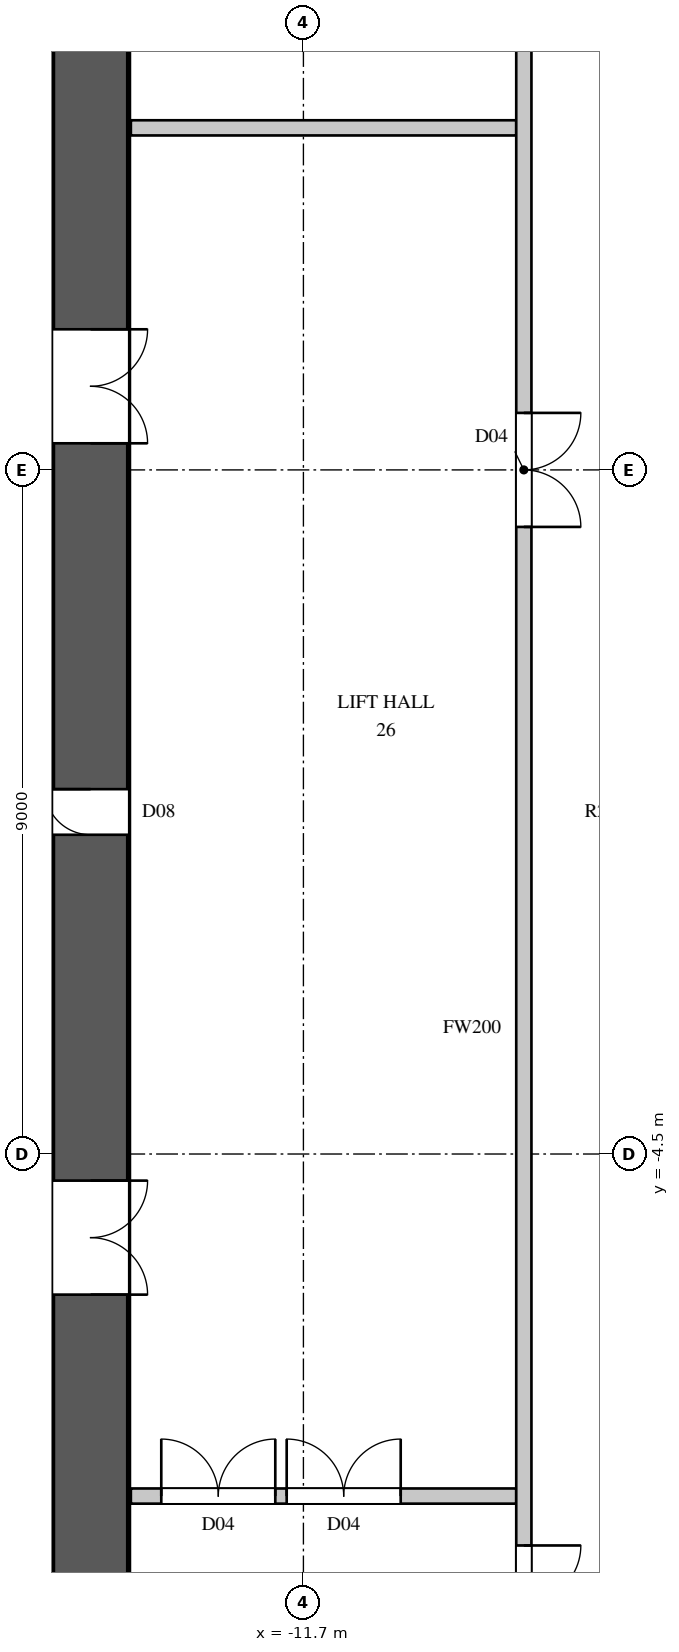
"""IFC4 building model, lengths in metres.
Left out: names, types, materials, properties, quantities, classifications, styles, units other than length and angle.
Written with IfcOpenShell. Run it as: python <this file> out.ifc"""

import sys

from ifc_helpers import new_model, si_unit, direction, frame, frame_2d, origin, place, context, subcontext, project, spatial, rectangle, extrude, element, fill, save


model = new_model("IFC4")
c1 = context("Model", 3, precision=1e-05, world=origin(), true_north=direction((0.0, 1.0)))
c2 = subcontext(c1, "Body", "Model", "MODEL_VIEW")
j1 = project(units=[si_unit("LENGTHUNIT", "METRE"), si_unit("PLANEANGLEUNIT", "RADIAN")], contexts=[c1])
p1 = place(None, origin())
s1 = spatial("IfcSite", under=j1, at=p1, CompositionType="ELEMENT")
p2 = place(p1, origin())
s2 = spatial("IfcBuilding", under=s1, at=p2, CompositionType="ELEMENT")
p3 = place(p2, frame((0.0, 0.0, 123.9)))
s3 = spatial("IfcBuildingStorey", under=s2, at=p3, CompositionType="ELEMENT", Elevation=123.9)
p4 = place(p3, frame((-14.5, -14.8, 0.0), z_axis=(0.0, 0.0, 1.0), x_axis=(0.0, 1.0, 0.0)))
e1 = element("IfcWall", 1, at=p4, inside=s3, PredefinedType="SHEAR", context=c2, shape_type="SweptSolid", body=[
    extrude(rectangle(XDim=29.6, YDim=1.0, at=frame_2d((14.8, 0.0))), origin(), (0.0, 0.0, 1.0), 3.6),
])
p5 = place(p4, frame((8.45, 0.0, 0.0)))
e2 = element("IfcOpeningElement", 2, at=p5, cuts=e1, PredefinedType="OPENING", context=c2, shape_type="SweptSolid", body=[
    extrude(rectangle(XDim=1.5, YDim=2.4, at=frame_2d((0.75, 1.2))), frame((0.0, 0.51, 0.0), z_axis=(0.0, -1.0, 0.0), x_axis=(1.0, 0.0, 0.0)), (0.0, 0.0, 1.0), 1.02),
])
p6 = place(p4, frame((19.65, 0.0, 0.0)))
e3 = element("IfcOpeningElement", 3, at=p6, cuts=e1, PredefinedType="OPENING", context=c2, shape_type="SweptSolid", body=[
    extrude(rectangle(XDim=1.5, YDim=2.4, at=frame_2d((0.75, 1.2))), frame((0.0, 0.51, 0.0), z_axis=(0.0, -1.0, 0.0), x_axis=(1.0, 0.0, 0.0)), (0.0, 0.0, 1.0), 1.02),
])
p7 = place(p4, frame((14.5, 0.0, 0.0)))
e4 = element("IfcOpeningElement", 4, at=p7, cuts=e1, PredefinedType="OPENING", context=c2, shape_type="SweptSolid", body=[
    extrude(rectangle(XDim=0.6, YDim=2.0, at=frame_2d((0.3, 1.0))), frame((0.0, 0.51, 0.0), z_axis=(0.0, -1.0, 0.0), x_axis=(1.0, 0.0, 0.0)), (0.0, 0.0, 1.0), 1.02),
])
p8 = place(p3, frame((-13.97, -9.0, 0.0), z_axis=(0.0, 0.0, 1.0), x_axis=(1.0, 0.0, 0.0)))
e5 = element("IfcWall", 5, at=p8, inside=s3, PredefinedType="PARTITIONING", context=c2, shape_type="SweptSolid", body=[
    extrude(rectangle(XDim=5.07, YDim=0.2, at=frame_2d((2.535, 0.0))), origin(), (0.0, 0.0, 1.0), 3.3),
])
p9 = place(p8, frame((0.4, 0.0, 0.0)))
e6 = element("IfcOpeningElement", 6, at=p9, cuts=e5, PredefinedType="OPENING", context=c2, shape_type="SweptSolid", body=[
    extrude(rectangle(XDim=1.5, YDim=2.2, at=frame_2d((0.75, 1.1))), frame((0.0, 0.11, 0.0), z_axis=(0.0, -1.0, 0.0), x_axis=(1.0, 0.0, 0.0)), (0.0, 0.0, 1.0), 0.22),
])
p10 = place(p8, frame((2.05, 0.0, 0.0)))
e7 = element("IfcOpeningElement", 7, at=p10, cuts=e5, PredefinedType="OPENING", context=c2, shape_type="SweptSolid", body=[
    extrude(rectangle(XDim=1.5, YDim=2.2, at=frame_2d((0.75, 1.1))), frame((0.0, 0.11, 0.0), z_axis=(0.0, -1.0, 0.0), x_axis=(1.0, 0.0, 0.0)), (0.0, 0.0, 1.0), 0.22),
])
p11 = place(p3, frame((-13.97, 9.0, 0.0), z_axis=(0.0, 0.0, 1.0), x_axis=(1.0, 0.0, 0.0)))
e8 = element("IfcWall", 8, at=p11, inside=s3, PredefinedType="PARTITIONING", context=c2, shape_type="SweptSolid", body=[
    extrude(rectangle(XDim=5.07, YDim=0.2, at=frame_2d((2.535, 0.0))), origin(), (0.0, 0.0, 1.0), 3.3),
])
p12 = place(p3, frame((-8.8, -17.4, 0.0), z_axis=(0.0, 0.0, 1.0), x_axis=(0.0, 1.0, 0.0)))
e9 = element("IfcWall", 9, at=p12, inside=s3, PredefinedType="PARTITIONING", context=c2, shape_type="SweptSolid", body=[
    extrude(rectangle(XDim=29.1, YDim=0.2, at=frame_2d((14.55, 0.0))), origin(), (0.0, 0.0, 1.0), 3.3),
])
p13 = place(p12, frame((21.15, 0.0, 0.0)))
e10 = element("IfcOpeningElement", 10, at=p13, cuts=e9, PredefinedType="OPENING", context=c2, shape_type="SweptSolid", body=[
    extrude(rectangle(XDim=1.5, YDim=2.2, at=frame_2d((0.75, 1.1))), frame((0.0, 0.11, 0.0), z_axis=(0.0, -1.0, 0.0), x_axis=(1.0, 0.0, 0.0)), (0.0, 0.0, 1.0), 0.22),
])
p14 = place(p12, frame((6.25, 0.0, 0.0)))
e11 = element("IfcOpeningElement", 11, at=p14, cuts=e9, PredefinedType="OPENING", context=c2, shape_type="SweptSolid", body=[
    extrude(rectangle(XDim=1.5, YDim=2.2, at=frame_2d((0.75, 1.1))), frame((0.0, 0.11, 0.0), z_axis=(0.0, -1.0, 0.0), x_axis=(1.0, 0.0, 0.0)), (0.0, 0.0, 1.0), 0.22),
])
p15 = place(p12, frame((27.45, 0.0, 0.0)))
e12 = element("IfcOpeningElement", 12, at=p15, cuts=e9, PredefinedType="OPENING", context=c2, shape_type="SweptSolid", body=[
    extrude(rectangle(XDim=1.5, YDim=2.2, at=frame_2d((0.75, 1.1))), frame((0.0, 0.11, 0.0), z_axis=(0.0, -1.0, 0.0), x_axis=(1.0, 0.0, 0.0)), (0.0, 0.0, 1.0), 0.22),
])
p16 = place(p12, frame((0.15, 0.0, 0.0)))
e13 = element("IfcOpeningElement", 13, at=p16, cuts=e9, PredefinedType="OPENING", context=c2, shape_type="SweptSolid", body=[
    extrude(rectangle(XDim=0.9, YDim=2.2, at=frame_2d((0.45, 1.1))), frame((0.0, 0.11, 0.0), z_axis=(0.0, -1.0, 0.0), x_axis=(1.0, 0.0, 0.0)), (0.0, 0.0, 1.0), 0.22),
])
p17 = place(p13, origin())
e14 = element("IfcDoor", 14, at=p17, inside=s3, OperationType="DOUBLE_DOOR_SINGLE_SWING", PredefinedType="DOOR", context=c2, shape_type="SweptSolid", body=[
    extrude(rectangle(XDim=1.5, YDim=2.2, at=frame_2d((0.75, 1.1))), frame((0.0, 0.025, 0.0), z_axis=(0.0, -1.0, 0.0), x_axis=(1.0, 0.0, 0.0)), (0.0, 0.0, 1.0), 0.05),
])
fill(e10, e14)
p18 = place(p9, origin())
e15 = element("IfcDoor", 15, at=p18, inside=s3, OperationType="DOUBLE_DOOR_SINGLE_SWING", PredefinedType="DOOR", context=c2, shape_type="SweptSolid", body=[
    extrude(rectangle(XDim=1.5, YDim=2.2, at=frame_2d((0.75, 1.1))), frame((0.0, 0.025, 0.0), z_axis=(0.0, -1.0, 0.0), x_axis=(1.0, 0.0, 0.0)), (0.0, 0.0, 1.0), 0.05),
])
fill(e6, e15)
p19 = place(p10, origin())
e16 = element("IfcDoor", 16, at=p19, inside=s3, OperationType="DOUBLE_DOOR_SINGLE_SWING", PredefinedType="DOOR", context=c2, shape_type="SweptSolid", body=[
    extrude(rectangle(XDim=1.5, YDim=2.2, at=frame_2d((0.75, 1.1))), frame((0.0, 0.025, 0.0), z_axis=(0.0, -1.0, 0.0), x_axis=(1.0, 0.0, 0.0)), (0.0, 0.0, 1.0), 0.05),
])
fill(e7, e16)
p20 = place(p14, origin())
e17 = element("IfcDoor", 17, at=p20, inside=s3, OperationType="DOUBLE_DOOR_SINGLE_SWING", PredefinedType="DOOR", context=c2, shape_type="SweptSolid", body=[
    extrude(rectangle(XDim=1.5, YDim=2.2, at=frame_2d((0.75, 1.1))), frame((0.0, 0.025, 0.0), z_axis=(0.0, -1.0, 0.0), x_axis=(1.0, 0.0, 0.0)), (0.0, 0.0, 1.0), 0.05),
])
fill(e11, e17)
p21 = place(p5, origin())
e18 = element("IfcDoor", 18, at=p21, inside=s3, OperationType="DOUBLE_DOOR_SINGLE_SWING", PredefinedType="DOOR", context=c2, shape_type="SweptSolid", body=[
    extrude(rectangle(XDim=1.5, YDim=2.4, at=frame_2d((0.75, 1.2))), frame((0.0, -0.445, 0.0), z_axis=(0.0, -1.0, 0.0), x_axis=(1.0, 0.0, 0.0)), (0.0, 0.0, 1.0), 0.05),
])
fill(e2, e18)
p22 = place(p6, origin())
e19 = element("IfcDoor", 19, at=p22, inside=s3, OperationType="DOUBLE_DOOR_SINGLE_SWING", PredefinedType="DOOR", context=c2, shape_type="SweptSolid", body=[
    extrude(rectangle(XDim=1.5, YDim=2.4, at=frame_2d((0.75, 1.2))), frame((0.0, -0.445, 0.0), z_axis=(0.0, -1.0, 0.0), x_axis=(1.0, 0.0, 0.0)), (0.0, 0.0, 1.0), 0.05),
])
fill(e3, e19)
p23 = place(p7, origin())
e20 = element("IfcDoor", 20, at=p23, inside=s3, OperationType="SINGLE_SWING_RIGHT", PredefinedType="DOOR", context=c2, shape_type="SweptSolid", body=[
    extrude(rectangle(XDim=0.6, YDim=2.0, at=frame_2d((0.3, 1.0))), frame((0.0, 0.495, 0.0), z_axis=(0.0, -1.0, 0.0), x_axis=(1.0, 0.0, 0.0)), (0.0, 0.0, 1.0), 0.05),
])
fill(e4, e20)
save(model, sys.argv[1])
